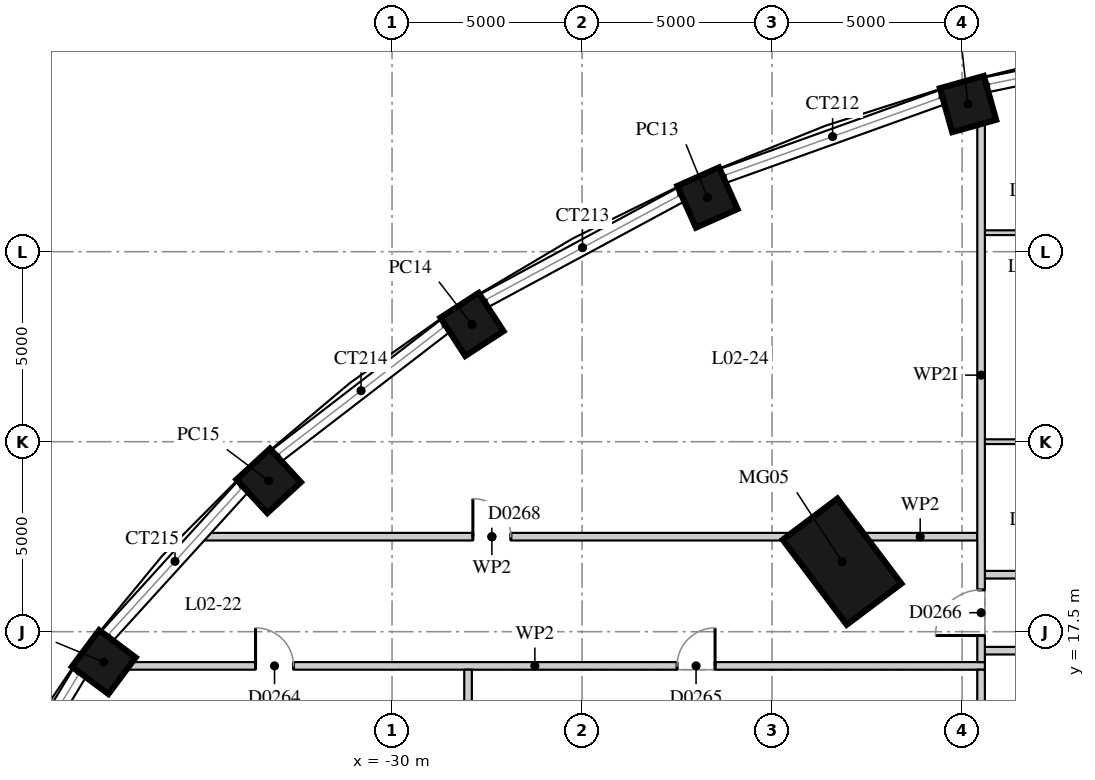
"""IFC4 building model, lengths in metres.
Left out: names, types, materials, properties, quantities, classifications, styles, units other than length and angle.
Written with IfcOpenShell. Run it as: python <this file> out.ifc"""

import sys

from ifc_helpers import new_model, si_unit, direction, frame, frame_2d, origin, origin_2d, place, context, subcontext, project, spatial, rectangle, extrude, element, fill, save


model = new_model("IFC4")
c1 = context("Model", 3, precision=1e-05, world=origin(), true_north=direction((0.0, 1.0)))
c2 = subcontext(c1, "Body", "Model", "MODEL_VIEW")
j1 = project(units=[si_unit("LENGTHUNIT", "METRE"), si_unit("PLANEANGLEUNIT", "RADIAN")], contexts=[c1])
p1 = place(None, origin())
s1 = spatial("IfcSite", under=j1, at=p1, CompositionType="ELEMENT")
p2 = place(p1, origin())
s2 = spatial("IfcBuilding", under=s1, at=p2, CompositionType="ELEMENT")
p3 = place(p2, frame((0.0, 0.0, 12.5)))
s3 = spatial("IfcBuildingStorey", under=s2, at=p3, CompositionType="ELEMENT", Elevation=12.5)
p4 = place(p3, frame((-18.159, 19.343, 0.0), z_axis=(0.0, 0.0, 1.0), x_axis=(-0.601173783055, 0.79911831575, 0.0)))
e1 = element("IfcColumn", 1, at=p4, inside=s3, PredefinedType="COLUMN", context=c2, shape_type="SweptSolid", body=[
    extrude(rectangle(XDim=2.8, YDim=1.8, at=origin_2d()), origin(), (0.0, 0.0, 1.0), 5.0),
])
for number, where, z_axis, x_axis in (
    (2, (-14.844, 31.386, 0.0), (0.0, 0.0, 1.0), (-0.271, 0.963, 0.0)),
    (3, (-21.7, 28.925, 0.0), (0.0, 0.0, 1.0), (-0.407, 0.913, 0.0)),
    (4, (-27.897, 25.586, 0.0), (0.0, 0.0, 1.0), (-0.544, 0.839, 0.0)),
    (5, (-33.246, 21.469, 0.0), (0.0, 0.0, 1.0), (-0.677, 0.736, 0.0)),
    (6, (-37.585, 16.7, 0.0), (0.0, 0.0, 1.0), (-0.801, 0.599, 0.0)),
):
    element("IfcColumn", number, at=place(p3, frame(where, z_axis=z_axis, x_axis=x_axis)), inside=s3, PredefinedType="COLUMN", context=c2, shape_type="SweptSolid", body=[
        extrude(rectangle(XDim=1.2, YDim=1.2, at=origin_2d()), origin(), (0.0, 0.0, 1.0), 5.0),
    ])
p5 = place(p3, frame((-38.084, 16.6, 0.0), z_axis=(0.0, 0.0, 1.0), x_axis=(1.0, 0.0, 0.0)))
e7 = element("IfcWall", 7, at=p5, inside=s3, PredefinedType="PARTITIONING", context=c2, shape_type="SweptSolid", body=[
    extrude(rectangle(XDim=23.685, YDim=0.2, at=frame_2d((11.842, 0.0))), origin(), (0.0, 0.0, 1.0), 4.65),
])
p6 = place(p5, frame((4.492, 0.0, 0.0)))
e8 = element("IfcOpeningElement", 8, at=p6, cuts=e7, PredefinedType="OPENING", context=c2, shape_type="SweptSolid", body=[
    extrude(rectangle(XDim=1.0, YDim=2.1, at=frame_2d((0.5, 1.05))), frame((0.0, 0.11, 0.0), z_axis=(0.0, -1.0, 0.0), x_axis=(1.0, 0.0, 0.0)), (0.0, 0.0, 1.0), 0.22),
])
p7 = place(p5, frame((15.584, 0.0, 0.0)))
e9 = element("IfcOpeningElement", 9, at=p7, cuts=e7, PredefinedType="OPENING", context=c2, shape_type="SweptSolid", body=[
    extrude(rectangle(XDim=1.0, YDim=2.1, at=frame_2d((0.5, 1.05))), frame((0.0, 0.11, 0.0), z_axis=(0.0, -1.0, 0.0), x_axis=(1.0, 0.0, 0.0)), (0.0, 0.0, 1.0), 0.22),
])
p8 = place(p3, frame((-14.4, 17.0, 0.0), z_axis=(0.0, 0.0, 1.0), x_axis=(1.0, 0.0, 0.0)))
e10 = element("IfcWall", 10, at=p8, inside=s3, PredefinedType="PARTITIONING", context=c2, shape_type="SweptSolid", body=[
    extrude(rectangle(XDim=5.0, YDim=0.2, at=frame_2d((2.5, 0.0))), origin(), (0.0, 0.0, 1.0), 4.65),
])
p9 = place(p3, frame((-14.4, 19.0, 0.0), z_axis=(0.0, 0.0, 1.0), x_axis=(1.0, 0.0, 0.0)))
e11 = element("IfcWall", 11, at=p9, inside=s3, PredefinedType="PARTITIONING", context=c2, shape_type="SweptSolid", body=[
    extrude(rectangle(XDim=3.0, YDim=0.2, at=frame_2d((1.5, 0.0))), origin(), (0.0, 0.0, 1.0), 4.65),
])
p10 = place(p3, frame((-35.231, 20.0, 0.0), z_axis=(0.0, 0.0, 1.0), x_axis=(1.0, 0.0, 0.0)))
e12 = element("IfcWall", 12, at=p10, inside=s3, PredefinedType="PARTITIONING", context=c2, shape_type="SweptSolid", body=[
    extrude(rectangle(XDim=15.718, YDim=0.2, at=frame_2d((7.859, 0.0))), origin(), (0.0, 0.0, 1.0), 4.65),
])
p11 = place(p10, frame((7.358, 0.0, 0.0)))
e13 = element("IfcOpeningElement", 13, at=p11, cuts=e12, PredefinedType="OPENING", context=c2, shape_type="SweptSolid", body=[
    extrude(rectangle(XDim=1.0, YDim=2.1, at=frame_2d((0.5, 1.05))), frame((0.0, 0.11, 0.0), z_axis=(0.0, -1.0, 0.0), x_axis=(1.0, 0.0, 0.0)), (0.0, 0.0, 1.0), 0.22),
])
p12 = place(p3, frame((-17.605, 20.0, 0.0), z_axis=(0.0, 0.0, 1.0), x_axis=(1.0, 0.0, 0.0)))
e14 = element("IfcWall", 14, at=p12, inside=s3, PredefinedType="PARTITIONING", context=c2, shape_type="SweptSolid", body=[
    extrude(rectangle(XDim=3.005, YDim=0.2, at=frame_2d((1.502, 0.0))), origin(), (0.0, 0.0, 1.0), 4.65),
])
for number, where, z_axis, x_axis in (
    (15, (-14.4, 22.5, 0.0), (0.0, 0.0, 1.0), (1.0, 0.0, 0.0)),
    (16, (-14.4, 28.0, 0.0), (0.0, 0.0, 1.0), (1.0, 0.0, 0.0)),
):
    element("IfcWall", number, at=place(p3, frame(where, z_axis=z_axis, x_axis=x_axis)), inside=s3, PredefinedType="PARTITIONING", context=c2, shape_type="SweptSolid", body=[
        extrude(rectangle(XDim=2.8, YDim=0.125, at=frame_2d((1.4, 0.0))), origin(), (0.0, 0.0, 1.0), 4.65),
    ])
p13 = place(p3, frame((-28.0, 8.677, 0.0), z_axis=(0.0, 0.0, 1.0), x_axis=(0.0, 1.0, 0.0)))
e17 = element("IfcWall", 17, at=p13, inside=s3, PredefinedType="PARTITIONING", context=c2, shape_type="SweptSolid", body=[
    extrude(rectangle(XDim=7.823, YDim=0.2, at=frame_2d((3.912, 0.0))), origin(), (0.0, 0.0, 1.0), 4.65),
])
p14 = place(p13, frame((3.012, 0.0, 0.0)))
e18 = element("IfcOpeningElement", 18, at=p14, cuts=e17, PredefinedType="OPENING", context=c2, shape_type="SweptSolid", body=[
    extrude(rectangle(XDim=1.8, YDim=2.1, at=frame_2d((0.9, 1.05))), frame((0.0, 0.11, 0.0), z_axis=(0.0, -1.0, 0.0), x_axis=(1.0, 0.0, 0.0)), (0.0, 0.0, 1.0), 0.22),
])
p15 = place(p3, frame((-14.5, 13.9, 0.0), z_axis=(0.0, 0.0, 1.0), x_axis=(0.0, 1.0, 0.0)))
e19 = element("IfcWall", 19, at=p15, inside=s3, PredefinedType="PARTITIONING", context=c2, shape_type="SweptSolid", body=[
    extrude(rectangle(XDim=2.6, YDim=0.2, at=frame_2d((1.3, 0.0))), origin(), (0.0, 0.0, 1.0), 4.2),
])
p16 = place(p3, frame((-14.5, 16.7, 0.0), z_axis=(0.0, 0.0, 1.0), x_axis=(0.0, 1.0, 0.0)))
e20 = element("IfcWall", 20, at=p16, inside=s3, PredefinedType="PARTITIONING", context=c2, shape_type="SweptSolid", body=[
    extrude(rectangle(XDim=15.103, YDim=0.2, at=frame_2d((7.552, 0.0))), origin(), (0.0, 0.0, 1.0), 4.2),
])
p17 = place(p16, frame((0.7, 0.0, 0.0)))
e21 = element("IfcOpeningElement", 21, at=p17, cuts=e20, PredefinedType="OPENING", context=c2, shape_type="SweptSolid", body=[
    extrude(rectangle(XDim=1.2, YDim=2.1, at=frame_2d((0.6, 1.05))), frame((0.0, 0.11, 0.0), z_axis=(0.0, -1.0, 0.0), x_axis=(1.0, 0.0, 0.0)), (0.0, 0.0, 1.0), 0.22),
])
p18 = place(p6, origin())
e22 = element("IfcDoor", 22, at=p18, inside=s3, OperationType="SINGLE_SWING_LEFT", PredefinedType="DOOR", context=c2, shape_type="SweptSolid", body=[
    extrude(rectangle(XDim=1.0, YDim=2.1, at=frame_2d((0.5, 1.05))), frame((0.0, 0.025, 0.0), z_axis=(0.0, -1.0, 0.0), x_axis=(1.0, 0.0, 0.0)), (0.0, 0.0, 1.0), 0.05),
])
fill(e8, e22)
p19 = place(p7, origin())
e23 = element("IfcDoor", 23, at=p19, inside=s3, OperationType="SINGLE_SWING_RIGHT", PredefinedType="DOOR", context=c2, shape_type="SweptSolid", body=[
    extrude(rectangle(XDim=1.0, YDim=2.1, at=frame_2d((0.5, 1.05))), frame((0.0, 0.025, 0.0), z_axis=(0.0, -1.0, 0.0), x_axis=(1.0, 0.0, 0.0)), (0.0, 0.0, 1.0), 0.05),
])
fill(e9, e23)
p20 = place(p11, origin())
e24 = element("IfcDoor", 24, at=p20, inside=s3, OperationType="SINGLE_SWING_LEFT", PredefinedType="DOOR", context=c2, shape_type="SweptSolid", body=[
    extrude(rectangle(XDim=1.0, YDim=2.1, at=frame_2d((0.5, 1.05))), frame((0.0, 0.025, 0.0), z_axis=(0.0, -1.0, 0.0), x_axis=(1.0, 0.0, 0.0)), (0.0, 0.0, 1.0), 0.05),
])
fill(e13, e24)
p21 = place(p17, origin())
e25 = element("IfcDoor", 25, at=p21, inside=s3, OperationType="SINGLE_SWING_LEFT", PredefinedType="DOOR", context=c2, shape_type="SweptSolid", body=[
    extrude(rectangle(XDim=1.2, YDim=2.1, at=frame_2d((0.6, 1.05))), frame((0.0, 0.025, 0.0), z_axis=(0.0, -1.0, 0.0), x_axis=(1.0, 0.0, 0.0)), (0.0, 0.0, 1.0), 0.05),
])
fill(e21, e25)
save(model, sys.argv[1])
